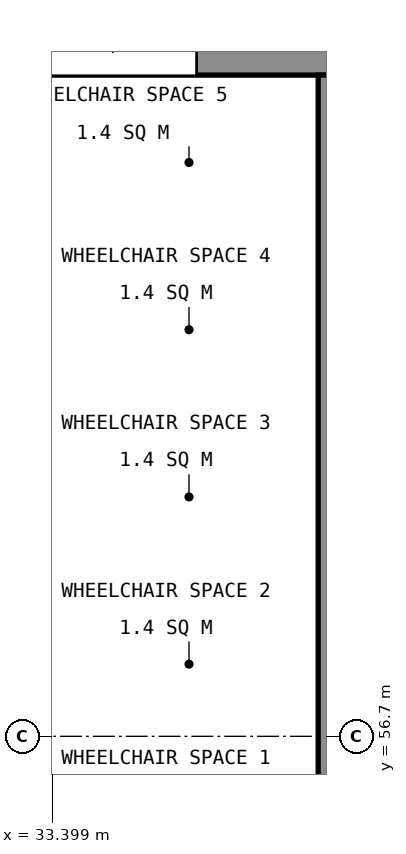
"""IFC4 building model, lengths in metres.
Left out: names, types, materials, properties, quantities, classifications, styles, units other than length and angle.
Written with IfcOpenShell. Run it as: python <this file> out.ifc"""

import sys

from ifc_helpers import new_model, si_unit, direction, frame, frame_2d, origin, place, context, subcontext, project, spatial, rectangle, extrude, element, fill, save


model = new_model("IFC4")
c1 = context("Model", 3, precision=1e-05, world=origin(), true_north=direction((0.0, 1.0)))
c2 = subcontext(c1, "Body", "Model", "MODEL_VIEW")
j1 = project(units=[si_unit("LENGTHUNIT", "METRE"), si_unit("PLANEANGLEUNIT", "RADIAN")], contexts=[c1])
p1 = place(None, origin())
s1 = spatial("IfcSite", under=j1, at=p1, CompositionType="ELEMENT")
p2 = place(p1, origin())
s2 = spatial("IfcBuilding", under=s1, at=p2, CompositionType="ELEMENT")
p3 = place(p2, origin())
s3 = spatial("IfcBuildingStorey", under=s2, at=p3, CompositionType="ELEMENT", Elevation=0.0)
p4 = place(p3, frame((27.8, 65.7, 0.0), z_axis=(0.0, 0.0, 1.0), x_axis=(1.0, 0.0, 0.0)))
e1 = element("IfcWall", 1, at=p4, inside=s3, PredefinedType="SOLIDWALL", context=c2, shape_type="SweptSolid", body=[
    extrude(rectangle(XDim=27.4, YDim=0.6, at=frame_2d((13.7, 0.0))), origin(), (0.0, 0.0, 1.0), 6.0),
])
p5 = place(p4, frame((2.9, 0.0, 0.0)))
e2 = element("IfcOpeningElement", 2, at=p5, cuts=e1, PredefinedType="OPENING", context=c2, shape_type="SweptSolid", body=[
    extrude(rectangle(XDim=2.2, YDim=2.4, at=frame_2d((1.1, 1.2))), frame((0.0, 0.31, 0.0), z_axis=(0.0, -1.0, 0.0), x_axis=(1.0, 0.0, 0.0)), (0.0, 0.0, 1.0), 0.62),
])
p6 = place(p4, frame((5.3, 0.0, 0.0)))
e3 = element("IfcOpeningElement", 3, at=p6, cuts=e1, PredefinedType="OPENING", context=c2, shape_type="SweptSolid", body=[
    extrude(rectangle(XDim=2.2, YDim=2.4, at=frame_2d((1.1, 1.2))), frame((0.0, 0.31, 0.0), z_axis=(0.0, -1.0, 0.0), x_axis=(1.0, 0.0, 0.0)), (0.0, 0.0, 1.0), 0.62),
])
p7 = place(p4, frame((20.65, 0.0, 0.0)))
e4 = element("IfcOpeningElement", 4, at=p7, cuts=e1, PredefinedType="OPENING", context=c2, shape_type="SweptSolid", body=[
    extrude(rectangle(XDim=1.5, YDim=2.4, at=frame_2d((0.75, 1.2))), frame((0.0, 0.31, 0.0), z_axis=(0.0, -1.0, 0.0), x_axis=(1.0, 0.0, 0.0)), (0.0, 0.0, 1.0), 0.62),
])
p8 = place(p3, frame((37.0, 43.6, 0.0), z_axis=(0.0, 0.0, 1.0), x_axis=(0.0, 1.0, 0.0)))
e5 = element("IfcWall", 5, at=p8, inside=s3, PredefinedType="SOLIDWALL", context=c2, shape_type="SweptSolid", body=[
    extrude(rectangle(XDim=21.8, YDim=0.2, at=frame_2d((10.9, 0.0))), origin(), (0.0, 0.0, 1.0), 0.2),
])
p9 = place(p6, origin())
e6 = element("IfcDoor", 6, at=p9, inside=s3, OperationType="DOUBLE_DOOR_SINGLE_SWING", PredefinedType="DOOR", context=c2, shape_type="SweptSolid", body=[
    extrude(rectangle(XDim=2.2, YDim=2.4, at=frame_2d((1.1, 1.2))), frame((0.0, 0.025, 0.0), z_axis=(0.0, -1.0, 0.0), x_axis=(1.0, 0.0, 0.0)), (0.0, 0.0, 1.0), 0.05),
])
fill(e3, e6)
save(model, sys.argv[1])
